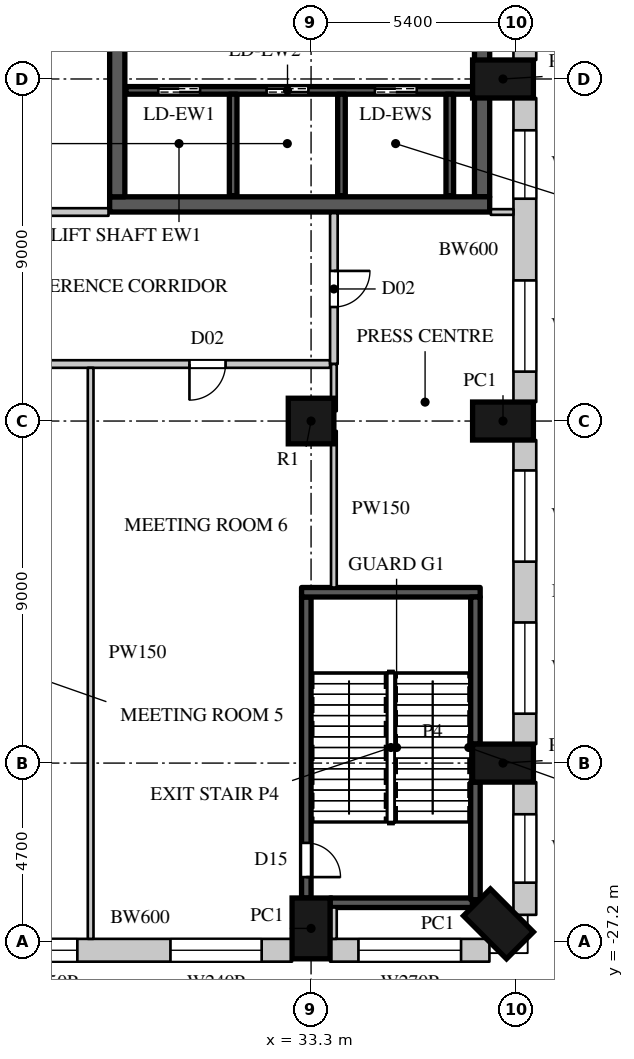
"""IFC4 building model, lengths in metres.
Left out: names, types, materials, properties, quantities, classifications, styles, units other than length and angle.
Written with IfcOpenShell. Run it as: python <this file> out.ifc"""

import sys

from ifc_helpers import new_model, si_unit, direction, frame, frame_2d, origin, origin_2d, place, context, subcontext, project, spatial, rectangle, circle, extrude, element, fill, save


model = new_model("IFC4")
c1 = context("Model", 3, precision=1e-05, world=origin(), true_north=direction((0.0, 1.0)))
c2 = subcontext(c1, "Body", "Model", "MODEL_VIEW")
j1 = project(units=[si_unit("LENGTHUNIT", "METRE"), si_unit("PLANEANGLEUNIT", "RADIAN")], contexts=[c1])
p1 = place(None, origin())
s1 = spatial("IfcSite", under=j1, at=p1, CompositionType="ELEMENT")
p2 = place(p1, origin())
s2 = spatial("IfcBuilding", under=s1, at=p2, CompositionType="ELEMENT")
p3 = place(p2, frame((0.0, 0.0, 19.0)))
s3 = spatial("IfcBuildingStorey", under=s2, at=p3, CompositionType="ELEMENT", Elevation=19.0)
for number, where, z_axis, x_axis in (
    (1, (33.3, -26.85, 0.0), (0.0, 0.0, 1.0), (1.0, 0.0, 0.0)),
    (2, (38.231, -26.731, 0.0), (0.0, 0.0, 1.0), (0.707, 0.707, 0.0)),
    (3, (38.35, -22.5, 0.0), (0.0, 0.0, 1.0), (0.0, 1.0, 0.0)),
    (4, (38.35, -13.5, 0.0), (0.0, 0.0, 1.0), (0.0, 1.0, 0.0)),
    (5, (38.35, -4.5, 0.0), (0.0, 0.0, 1.0), (0.0, 1.0, 0.0)),
):
    element("IfcColumn", number, at=place(p3, frame(where, z_axis=z_axis, x_axis=x_axis)), inside=s3, PredefinedType="COLUMN", context=c2, shape_type="SweptSolid", body=[
        extrude(rectangle(XDim=1.0, YDim=1.6, at=origin_2d()), origin(), (0.0, 0.0, 1.0), 10.0),
    ])
p4 = place(p3, frame((33.3, -13.5, 0.0), z_axis=(0.0, 0.0, 1.0), x_axis=(1.0, 0.0, 0.0)))
e6 = element("IfcColumn", 6, at=p4, inside=s3, PredefinedType="COLUMN", context=c2, shape_type="SweptSolid", body=[
    extrude(circle(Radius=0.6, at=origin_2d()), origin(), (0.0, 0.0, 1.0), 10.0),
])
p5 = place(p3, frame((24.8, -27.425, 0.0), z_axis=(0.0, 0.0, 1.0), x_axis=(1.0, 0.0, 0.0)))
e7 = element("IfcWall", 7, at=p5, inside=s3, PredefinedType="ELEMENTEDWALL", context=c2, shape_type="SweptSolid", body=[
    extrude(rectangle(XDim=8.0, YDim=0.6, at=frame_2d((4.0, 0.0))), origin(), (0.0, 0.0, 1.0), 9.6),
])
p6 = place(p5, frame((4.8, 0.0, 3.0)))
e8 = element("IfcOpeningElement", 8, at=p6, cuts=e7, PredefinedType="OPENING", context=c2, shape_type="SweptSolid", body=[
    extrude(rectangle(XDim=2.4, YDim=2.4, at=frame_2d((1.2, 1.2))), frame((0.0, 0.31, 0.0), z_axis=(0.0, -1.0, 0.0), x_axis=(1.0, 0.0, 0.0)), (0.0, 0.0, 1.0), 0.62),
])
p7 = place(p5, frame((0.85, 0.0, 3.0)))
e9 = element("IfcOpeningElement", 9, at=p7, cuts=e7, PredefinedType="OPENING", context=c2, shape_type="SweptSolid", body=[
    extrude(rectangle(XDim=1.5, YDim=2.4, at=frame_2d((0.75, 1.2))), frame((0.0, 0.31, 0.0), z_axis=(0.0, -1.0, 0.0), x_axis=(1.0, 0.0, 0.0)), (0.0, 0.0, 1.0), 0.62),
])
p8 = place(p3, frame((33.8, -27.425, 0.0), z_axis=(0.0, 0.0, 1.0), x_axis=(1.0, 0.0, 0.0)))
e10 = element("IfcWall", 10, at=p8, inside=s3, PredefinedType="ELEMENTEDWALL", context=c2, shape_type="SweptSolid", body=[
    extrude(rectangle(XDim=4.193, YDim=0.6, at=frame_2d((2.096, 0.0))), origin(), (0.0, 0.0, 1.0), 9.6),
])
p9 = place(p8, frame((0.746, 0.0, 3.0)))
e11 = element("IfcOpeningElement", 11, at=p9, cuts=e10, PredefinedType="OPENING", context=c2, shape_type="SweptSolid", body=[
    extrude(rectangle(XDim=2.7, YDim=2.4, at=frame_2d((1.35, 1.2))), frame((0.0, 0.31, 0.0), z_axis=(0.0, -1.0, 0.0), x_axis=(1.0, 0.0, 0.0)), (0.0, 0.0, 1.0), 0.62),
])
p10 = place(p3, frame((38.925, -26.493, 0.0), z_axis=(0.0, 0.0, 1.0), x_axis=(0.0, 1.0, 0.0)))
e12 = element("IfcWall", 12, at=p10, inside=s3, PredefinedType="ELEMENTEDWALL", context=c2, shape_type="SweptSolid", body=[
    extrude(rectangle(XDim=3.493, YDim=0.6, at=frame_2d((1.747, 0.0))), origin(), (0.0, 0.0, 1.0), 9.6),
])
p11 = place(p10, frame((0.846, 0.0, 3.0)))
e13 = element("IfcOpeningElement", 13, at=p11, cuts=e12, PredefinedType="OPENING", context=c2, shape_type="SweptSolid", body=[
    extrude(rectangle(XDim=1.8, YDim=2.4, at=frame_2d((0.9, 1.2))), frame((0.0, 0.31, 0.0), z_axis=(0.0, -1.0, 0.0), x_axis=(1.0, 0.0, 0.0)), (0.0, 0.0, 1.0), 0.62),
])
p12 = place(p3, frame((38.925, -22.0, 0.0), z_axis=(0.0, 0.0, 1.0), x_axis=(0.0, 1.0, 0.0)))
e14 = element("IfcWall", 14, at=p12, inside=s3, PredefinedType="ELEMENTEDWALL", context=c2, shape_type="SweptSolid", body=[
    extrude(rectangle(XDim=8.0, YDim=0.6, at=frame_2d((4.0, 0.0))), origin(), (0.0, 0.0, 1.0), 9.6),
])
p13 = place(p12, frame((0.8, 0.0, 3.0)))
e15 = element("IfcOpeningElement", 15, at=p13, cuts=e14, PredefinedType="OPENING", context=c2, shape_type="SweptSolid", body=[
    extrude(rectangle(XDim=2.4, YDim=2.4, at=frame_2d((1.2, 1.2))), frame((0.0, 0.31, 0.0), z_axis=(0.0, -1.0, 0.0), x_axis=(1.0, 0.0, 0.0)), (0.0, 0.0, 1.0), 0.62),
])
p14 = place(p12, frame((4.8, 0.0, 3.0)))
e16 = element("IfcOpeningElement", 16, at=p14, cuts=e14, PredefinedType="OPENING", context=c2, shape_type="SweptSolid", body=[
    extrude(rectangle(XDim=2.4, YDim=2.4, at=frame_2d((1.2, 1.2))), frame((0.0, 0.31, 0.0), z_axis=(0.0, -1.0, 0.0), x_axis=(1.0, 0.0, 0.0)), (0.0, 0.0, 1.0), 0.62),
])
p15 = place(p3, frame((38.925, -13.0, 0.0), z_axis=(0.0, 0.0, 1.0), x_axis=(0.0, 1.0, 0.0)))
e17 = element("IfcWall", 17, at=p15, inside=s3, PredefinedType="ELEMENTEDWALL", context=c2, shape_type="SweptSolid", body=[
    extrude(rectangle(XDim=8.0, YDim=0.6, at=frame_2d((4.0, 0.0))), origin(), (0.0, 0.0, 1.0), 9.6),
])
p16 = place(p15, frame((0.8, 0.0, 3.0)))
e18 = element("IfcOpeningElement", 18, at=p16, cuts=e17, PredefinedType="OPENING", context=c2, shape_type="SweptSolid", body=[
    extrude(rectangle(XDim=2.4, YDim=2.4, at=frame_2d((1.2, 1.2))), frame((0.0, 0.31, 0.0), z_axis=(0.0, -1.0, 0.0), x_axis=(1.0, 0.0, 0.0)), (0.0, 0.0, 1.0), 0.62),
])
p17 = place(p15, frame((5.35, 0.0, 3.0)))
e19 = element("IfcOpeningElement", 19, at=p17, cuts=e17, PredefinedType="OPENING", context=c2, shape_type="SweptSolid", body=[
    extrude(rectangle(XDim=1.8, YDim=2.4, at=frame_2d((0.9, 1.2))), frame((0.0, 0.31, 0.0), z_axis=(0.0, -1.0, 0.0), x_axis=(1.0, 0.0, 0.0)), (0.0, 0.0, 1.0), 0.62),
])
p18 = place(p3, frame((38.925, -4.0, 0.0), z_axis=(0.0, 0.0, 1.0), x_axis=(0.0, 1.0, 0.0)))
e20 = element("IfcWall", 20, at=p18, inside=s3, PredefinedType="ELEMENTEDWALL", context=c2, shape_type="SweptSolid", body=[
    extrude(rectangle(XDim=8.0, YDim=0.6, at=frame_2d((4.0, 0.0))), origin(), (0.0, 0.0, 1.0), 9.6),
])
p19 = place(p18, frame((0.8, 0.0, 3.0)))
e21 = element("IfcOpeningElement", 21, at=p19, cuts=e20, PredefinedType="OPENING", context=c2, shape_type="SweptSolid", body=[
    extrude(rectangle(XDim=2.4, YDim=2.4, at=frame_2d((1.2, 1.2))), frame((0.0, 0.31, 0.0), z_axis=(0.0, -1.0, 0.0), x_axis=(1.0, 0.0, 0.0)), (0.0, 0.0, 1.0), 0.62),
])
p20 = place(p18, frame((4.8, 0.0, 3.0)))
e22 = element("IfcOpeningElement", 22, at=p20, cuts=e20, PredefinedType="OPENING", context=c2, shape_type="SweptSolid", body=[
    extrude(rectangle(XDim=2.4, YDim=2.4, at=frame_2d((1.2, 1.2))), frame((0.0, 0.31, 0.0), z_axis=(0.0, -1.0, 0.0), x_axis=(1.0, 0.0, 0.0)), (0.0, 0.0, 1.0), 0.62),
])
p21 = place(p3, frame((28.0, -7.8, 0.0), z_axis=(0.0, 0.0, 1.0), x_axis=(1.0, 0.0, 0.0)))
e23 = element("IfcWall", 23, at=p21, inside=s3, PredefinedType="SHEAR", context=c2, shape_type="SweptSolid", body=[
    extrude(rectangle(XDim=10.0, YDim=0.4, at=frame_2d((5.0, 0.0))), origin(), (0.0, 0.0, 1.0), 10.0),
])
p22 = place(p3, frame((37.8, -7.6, 0.0), z_axis=(0.0, 0.0, 1.0), x_axis=(0.0, 1.0, 0.0)))
e24 = element("IfcWall", 24, at=p22, inside=s3, PredefinedType="SHEAR", context=c2, shape_type="SweptSolid", body=[
    extrude(rectangle(XDim=15.2, YDim=0.4, at=frame_2d((7.6, 0.0))), origin(), (0.0, 0.0, 1.0), 10.0),
])
p23 = place(p3, frame((28.2, -7.6, 0.0), z_axis=(0.0, 0.0, 1.0), x_axis=(0.0, 1.0, 0.0)))
e25 = element("IfcWall", 25, at=p23, inside=s3, PredefinedType="SHEAR", context=c2, shape_type="SweptSolid", body=[
    extrude(rectangle(XDim=15.2, YDim=0.4, at=frame_2d((7.6, 0.0))), origin(), (0.0, 0.0, 1.0), 10.0),
])
p24 = place(p23, frame((4.05, 0.0, 0.0)))
e26 = element("IfcOpeningElement", 26, at=p24, cuts=e25, PredefinedType="OPENING", context=c2, shape_type="SweptSolid", body=[
    extrude(rectangle(XDim=1.5, YDim=2.4, at=frame_2d((0.75, 1.2))), frame((0.0, 0.21, 0.0), z_axis=(0.0, -1.0, 0.0), x_axis=(1.0, 0.0, 0.0)), (0.0, 0.0, 1.0), 0.42),
])
p25 = place(p23, frame((6.95, 0.0, 0.0)))
e27 = element("IfcOpeningElement", 27, at=p25, cuts=e25, PredefinedType="OPENING", context=c2, shape_type="SweptSolid", body=[
    extrude(rectangle(XDim=1.5, YDim=2.4, at=frame_2d((0.75, 1.2))), frame((0.0, 0.21, 0.0), z_axis=(0.0, -1.0, 0.0), x_axis=(1.0, 0.0, 0.0)), (0.0, 0.0, 1.0), 0.42),
])
p26 = place(p3, frame((14.6, -12.0, 0.0), z_axis=(0.0, 0.0, 1.0), x_axis=(1.0, 0.0, 0.0)))
e28 = element("IfcWall", 28, at=p26, inside=s3, PredefinedType="PARTITIONING", context=c2, shape_type="SweptSolid", body=[
    extrude(rectangle(XDim=19.2, YDim=0.2, at=frame_2d((9.6, 0.0))), origin(), (0.0, 0.0, 1.0), 9.598),
])
p27 = place(p26, frame((2.8, 0.0, 0.0)))
e29 = element("IfcOpeningElement", 29, at=p27, cuts=e28, PredefinedType="OPENING", context=c2, shape_type="SweptSolid", body=[
    extrude(rectangle(XDim=0.95, YDim=2.2, at=frame_2d((0.475, 1.1))), frame((0.0, 0.11, 0.0), z_axis=(0.0, -1.0, 0.0), x_axis=(1.0, 0.0, 0.0)), (0.0, 0.0, 1.0), 0.22),
])
p28 = place(p26, frame((10.15, 0.0, 0.0)))
e30 = element("IfcOpeningElement", 30, at=p28, cuts=e28, PredefinedType="OPENING", context=c2, shape_type="SweptSolid", body=[
    extrude(rectangle(XDim=0.95, YDim=2.2, at=frame_2d((0.475, 1.1))), frame((0.0, 0.11, 0.0), z_axis=(0.0, -1.0, 0.0), x_axis=(1.0, 0.0, 0.0)), (0.0, 0.0, 1.0), 0.22),
])
p29 = place(p26, frame((15.5, 0.0, 0.0)))
e31 = element("IfcOpeningElement", 31, at=p29, cuts=e28, PredefinedType="OPENING", context=c2, shape_type="SweptSolid", body=[
    extrude(rectangle(XDim=0.95, YDim=2.2, at=frame_2d((0.475, 1.1))), frame((0.0, 0.11, 0.0), z_axis=(0.0, -1.0, 0.0), x_axis=(1.0, 0.0, 0.0)), (0.0, 0.0, 1.0), 0.22),
])
p30 = place(p3, frame((14.6, -8.0, 0.0), z_axis=(0.0, 0.0, 1.0), x_axis=(1.0, 0.0, 0.0)))
e32 = element("IfcWall", 32, at=p30, inside=s3, PredefinedType="PARTITIONING", context=c2, shape_type="SweptSolid", body=[
    extrude(rectangle(XDim=13.37, YDim=0.2, at=frame_2d((6.685, 0.0))), origin(), (0.0, 0.0, 1.0), 9.598),
])
p31 = place(p30, frame((5.9, 0.0, 0.0)))
e33 = element("IfcOpeningElement", 33, at=p31, cuts=e32, PredefinedType="OPENING", context=c2, shape_type="SweptSolid", body=[
    extrude(rectangle(XDim=1.5, YDim=2.4, at=frame_2d((0.75, 1.2))), frame((0.0, 0.11, 0.0), z_axis=(0.0, -1.0, 0.0), x_axis=(1.0, 0.0, 0.0)), (0.0, 0.0, 1.0), 0.22),
])
p32 = place(p3, frame((33.9, -12.0, 0.0), z_axis=(0.0, 0.0, 1.0), x_axis=(0.0, 1.0, 0.0)))
e34 = element("IfcWall", 34, at=p32, inside=s3, PredefinedType="PARTITIONING", context=c2, shape_type="SweptSolid", body=[
    extrude(rectangle(XDim=3.97, YDim=0.2, at=frame_2d((1.985, 0.0))), origin(), (0.0, 0.0, 1.0), 9.598),
])
p33 = place(p32, frame((1.5, 0.0, 0.0)))
e35 = element("IfcOpeningElement", 35, at=p33, cuts=e34, PredefinedType="OPENING", context=c2, shape_type="SweptSolid", body=[
    extrude(rectangle(XDim=0.95, YDim=2.2, at=frame_2d((0.475, 1.1))), frame((0.0, 0.11, 0.0), z_axis=(0.0, -1.0, 0.0), x_axis=(1.0, 0.0, 0.0)), (0.0, 0.0, 1.0), 0.22),
])
p34 = place(p3, frame((27.5, -27.125, 0.0), z_axis=(0.0, 0.0, 1.0), x_axis=(0.0, 1.0, 0.0)))
e36 = element("IfcWall", 36, at=p34, inside=s3, PredefinedType="PARTITIONING", context=c2, shape_type="SweptSolid", body=[
    extrude(rectangle(XDim=15.025, YDim=0.15, at=frame_2d((7.512, 0.0))), origin(), (0.0, 0.0, 1.0), 9.598),
])
p35 = place(p3, frame((33.9, -27.125, 0.0), z_axis=(0.0, 0.0, 1.0), x_axis=(0.0, 1.0, 0.0)))
e37 = element("IfcWall", 37, at=p35, inside=s3, PredefinedType="PARTITIONING", context=c2, shape_type="SweptSolid", body=[
    extrude(rectangle(XDim=0.825, YDim=0.15, at=frame_2d((0.413, 0.0))), origin(), (0.0, 0.0, 1.0), 9.598),
])
p36 = place(p3, frame((33.9, -17.88, 0.0), z_axis=(0.0, 0.0, 1.0), x_axis=(0.0, 1.0, 0.0)))
e38 = element("IfcWall", 38, at=p36, inside=s3, PredefinedType="PARTITIONING", context=c2, shape_type="SweptSolid", body=[
    extrude(rectangle(XDim=4.12, YDim=0.15, at=frame_2d((2.06, 0.0))), origin(), (0.0, 0.0, 1.0), 9.598),
])
p37 = place(p3, frame((33.9, -13.24, 0.0), z_axis=(0.0, 0.0, 1.0), x_axis=(0.0, 1.0, 0.0)))
e39 = element("IfcWall", 39, at=p37, inside=s3, PredefinedType="PARTITIONING", context=c2, shape_type="SweptSolid", body=[
    extrude(rectangle(XDim=1.24, YDim=0.15, at=frame_2d((0.62, 0.0))), origin(), (0.0, 0.0, 1.0), 9.598),
])
p38 = place(p3, frame((38.03, -8.0, 0.0), z_axis=(0.0, 0.0, 1.0), x_axis=(1.0, 0.0, 0.0)))
e40 = element("IfcWall", 40, at=p38, inside=s3, PredefinedType="PARTITIONING", context=c2, shape_type="SweptSolid", body=[
    extrude(rectangle(XDim=0.595, YDim=0.15, at=frame_2d((0.297, 0.0))), origin(), (0.0, 0.0, 1.0), 9.598),
])
p39 = place(p3, frame((28.43, -4.8, 0.0), z_axis=(0.0, 0.0, 1.0), x_axis=(1.0, 0.0, 0.0)))
e41 = element("IfcWall", 41, at=p39, inside=s3, PredefinedType="SHEAR", context=c2, shape_type="SweptSolid", body=[
    extrude(rectangle(XDim=9.13, YDim=0.2, at=frame_2d((4.565, 0.0))), origin(), (0.0, 0.0, 1.0), 9.598),
])
p40 = place(p39, frame((0.85, 0.0, 0.0)))
e42 = element("IfcOpeningElement", 42, at=p40, cuts=e41, PredefinedType="OPENING", context=c2, shape_type="SweptSolid", body=[
    extrude(rectangle(XDim=1.1, YDim=2.2, at=frame_2d((0.55, 1.1))), frame((0.0, 0.11, 0.0), z_axis=(0.0, -1.0, 0.0), x_axis=(1.0, 0.0, 0.0)), (0.0, 0.0, 1.0), 0.22),
])
p41 = place(p39, frame((3.7, 0.0, 0.0)))
e43 = element("IfcOpeningElement", 43, at=p41, cuts=e41, PredefinedType="OPENING", context=c2, shape_type="SweptSolid", body=[
    extrude(rectangle(XDim=1.1, YDim=2.2, at=frame_2d((0.55, 1.1))), frame((0.0, 0.11, 0.0), z_axis=(0.0, -1.0, 0.0), x_axis=(1.0, 0.0, 0.0)), (0.0, 0.0, 1.0), 0.22),
])
p42 = place(p39, frame((6.55, 0.0, 0.0)))
e44 = element("IfcOpeningElement", 44, at=p42, cuts=e41, PredefinedType="OPENING", context=c2, shape_type="SweptSolid", body=[
    extrude(rectangle(XDim=1.1, YDim=2.2, at=frame_2d((0.55, 1.1))), frame((0.0, 0.11, 0.0), z_axis=(0.0, -1.0, 0.0), x_axis=(1.0, 0.0, 0.0)), (0.0, 0.0, 1.0), 0.22),
])
for number, where, z_axis, x_axis in (
    (45, (31.25, -7.57, 0.0), (0.0, 0.0, 1.0), (0.0, 1.0, 0.0)),
    (46, (34.1, -7.57, 0.0), (0.0, 0.0, 1.0), (0.0, 1.0, 0.0)),
):
    element("IfcWall", number, at=place(p3, frame(where, z_axis=z_axis, x_axis=x_axis)), inside=s3, PredefinedType="SHEAR", context=c2, shape_type="SweptSolid", body=[
        extrude(rectangle(XDim=2.67, YDim=0.2, at=frame_2d((1.335, 0.0))), origin(), (0.0, 0.0, 1.0), 10.0),
    ])
p43 = place(p3, frame((36.95, -7.57, 0.0), z_axis=(0.0, 0.0, 1.0), x_axis=(0.0, 1.0, 0.0)))
e47 = element("IfcWall", 47, at=p43, inside=s3, PredefinedType="SHEAR", context=c2, shape_type="SweptSolid", body=[
    extrude(rectangle(XDim=2.67, YDim=0.2, at=frame_2d((1.335, 0.0))), origin(), (0.0, 0.0, 1.0), 9.598),
])
p44 = place(p3, frame((33.175, -26.05, 0.0), z_axis=(0.0, 0.0, 1.0), x_axis=(0.0, 1.0, 0.0)))
e48 = element("IfcWall", 48, at=p44, inside=s3, PredefinedType="SHEAR", context=c2, shape_type="SweptSolid", body=[
    extrude(rectangle(XDim=7.92, YDim=0.25, at=frame_2d((3.96, 0.0))), origin(), (0.0, 0.0, 1.0), 9.6),
])
p45 = place(p44, frame((0.55, 0.0, 0.0)))
e49 = element("IfcOpeningElement", 49, at=p45, cuts=e48, PredefinedType="OPENING", context=c2, shape_type="SweptSolid", body=[
    extrude(rectangle(XDim=0.9, YDim=2.2, at=frame_2d((0.45, 1.1))), frame((0.0, 0.135, 0.0), z_axis=(0.0, -1.0, 0.0), x_axis=(1.0, 0.0, 0.0)), (0.0, 0.0, 1.0), 0.27),
])
p46 = place(p3, frame((33.8, -26.175, 0.0), z_axis=(0.0, 0.0, 1.0), x_axis=(1.0, 0.0, 0.0)))
e50 = element("IfcWall", 50, at=p46, inside=s3, PredefinedType="SHEAR", context=c2, shape_type="SweptSolid", body=[
    extrude(rectangle(XDim=3.745, YDim=0.25, at=frame_2d((1.873, 0.0))), origin(), (0.0, 0.0, 1.0), 9.6),
])
p47 = place(p3, frame((33.05, -18.005, 0.0), z_axis=(0.0, 0.0, 1.0), x_axis=(1.0, 0.0, 0.0)))
e51 = element("IfcWall", 51, at=p47, inside=s3, PredefinedType="SHEAR", context=c2, shape_type="SweptSolid", body=[
    extrude(rectangle(XDim=4.7, YDim=0.25, at=frame_2d((2.35, 0.0))), origin(), (0.0, 0.0, 1.0), 9.6),
])
p48 = place(p3, frame((37.625, -26.095, 0.0), z_axis=(0.0, 0.0, 1.0), x_axis=(0.0, 1.0, 0.0)))
e52 = element("IfcWall", 52, at=p48, inside=s3, PredefinedType="SHEAR", context=c2, shape_type="SweptSolid", body=[
    extrude(rectangle(XDim=3.095, YDim=0.25, at=frame_2d((1.548, 0.0))), origin(), (0.0, 0.0, 1.0), 9.6),
])
p49 = place(p3, frame((37.625, -22.0, 0.0), z_axis=(0.0, 0.0, 1.0), x_axis=(0.0, 1.0, 0.0)))
e53 = element("IfcWall", 53, at=p49, inside=s3, PredefinedType="SHEAR", context=c2, shape_type="SweptSolid", body=[
    extrude(rectangle(XDim=3.87, YDim=0.25, at=frame_2d((1.935, 0.0))), origin(), (0.0, 0.0, 1.0), 9.6),
])
p50 = place(p6, origin())
e54 = element("IfcWindow", 54, at=p50, inside=s3, PartitioningType="SINGLE_PANEL", PredefinedType="WINDOW", context=c2, shape_type="SweptSolid", body=[
    extrude(rectangle(XDim=2.4, YDim=2.4, at=frame_2d((1.2, 1.2))), frame((0.0, 0.06, 0.0), z_axis=(0.0, -1.0, 0.0), x_axis=(1.0, 0.0, 0.0)), (0.0, 0.0, 1.0), 0.06),
])
fill(e8, e54)
p51 = place(p9, origin())
e55 = element("IfcWindow", 55, at=p51, inside=s3, PartitioningType="SINGLE_PANEL", PredefinedType="WINDOW", context=c2, shape_type="SweptSolid", body=[
    extrude(rectangle(XDim=2.7, YDim=2.4, at=frame_2d((1.35, 1.2))), frame((0.0, 0.06, 0.0), z_axis=(0.0, -1.0, 0.0), x_axis=(1.0, 0.0, 0.0)), (0.0, 0.0, 1.0), 0.06),
])
fill(e11, e55)
p52 = place(p11, origin())
e56 = element("IfcWindow", 56, at=p52, inside=s3, PartitioningType="SINGLE_PANEL", PredefinedType="WINDOW", context=c2, shape_type="SweptSolid", body=[
    extrude(rectangle(XDim=1.8, YDim=2.4, at=frame_2d((0.9, 1.2))), frame((0.0, 0.06, 0.0), z_axis=(0.0, -1.0, 0.0), x_axis=(1.0, 0.0, 0.0)), (0.0, 0.0, 1.0), 0.06),
])
fill(e13, e56)
p53 = place(p13, origin())
e57 = element("IfcWindow", 57, at=p53, inside=s3, PartitioningType="SINGLE_PANEL", PredefinedType="WINDOW", context=c2, shape_type="SweptSolid", body=[
    extrude(rectangle(XDim=2.4, YDim=2.4, at=frame_2d((1.2, 1.2))), frame((0.0, 0.06, 0.0), z_axis=(0.0, -1.0, 0.0), x_axis=(1.0, 0.0, 0.0)), (0.0, 0.0, 1.0), 0.06),
])
fill(e15, e57)
p54 = place(p14, origin())
e58 = element("IfcWindow", 58, at=p54, inside=s3, PartitioningType="SINGLE_PANEL", PredefinedType="WINDOW", context=c2, shape_type="SweptSolid", body=[
    extrude(rectangle(XDim=2.4, YDim=2.4, at=frame_2d((1.2, 1.2))), frame((0.0, 0.06, 0.0), z_axis=(0.0, -1.0, 0.0), x_axis=(1.0, 0.0, 0.0)), (0.0, 0.0, 1.0), 0.06),
])
fill(e16, e58)
p55 = place(p16, origin())
e59 = element("IfcWindow", 59, at=p55, inside=s3, PartitioningType="SINGLE_PANEL", PredefinedType="WINDOW", context=c2, shape_type="SweptSolid", body=[
    extrude(rectangle(XDim=2.4, YDim=2.4, at=frame_2d((1.2, 1.2))), frame((0.0, 0.06, 0.0), z_axis=(0.0, -1.0, 0.0), x_axis=(1.0, 0.0, 0.0)), (0.0, 0.0, 1.0), 0.06),
])
fill(e18, e59)
p56 = place(p40, origin())
e60 = element("IfcDoor", 60, at=p56, inside=s3, OperationType="DOUBLE_DOOR_SLIDING", PredefinedType="DOOR", context=c2, shape_type="SweptSolid", body=[
    extrude(rectangle(XDim=1.1, YDim=2.2, at=frame_2d((0.55, 1.1))), frame((0.0, 0.025, 0.0), z_axis=(0.0, -1.0, 0.0), x_axis=(1.0, 0.0, 0.0)), (0.0, 0.0, 1.0), 0.05),
])
fill(e42, e60)
p57 = place(p41, origin())
e61 = element("IfcDoor", 61, at=p57, inside=s3, OperationType="DOUBLE_DOOR_SLIDING", PredefinedType="DOOR", context=c2, shape_type="SweptSolid", body=[
    extrude(rectangle(XDim=1.1, YDim=2.2, at=frame_2d((0.55, 1.1))), frame((0.0, 0.025, 0.0), z_axis=(0.0, -1.0, 0.0), x_axis=(1.0, 0.0, 0.0)), (0.0, 0.0, 1.0), 0.05),
])
fill(e43, e61)
p58 = place(p42, origin())
e62 = element("IfcDoor", 62, at=p58, inside=s3, OperationType="DOUBLE_DOOR_SLIDING", PredefinedType="DOOR", context=c2, shape_type="SweptSolid", body=[
    extrude(rectangle(XDim=1.1, YDim=2.2, at=frame_2d((0.55, 1.1))), frame((0.0, 0.025, 0.0), z_axis=(0.0, -1.0, 0.0), x_axis=(1.0, 0.0, 0.0)), (0.0, 0.0, 1.0), 0.05),
])
fill(e44, e62)
p59 = place(p29, origin())
e63 = element("IfcDoor", 63, at=p59, inside=s3, OperationType="SINGLE_SWING_RIGHT", PredefinedType="DOOR", context=c2, shape_type="SweptSolid", body=[
    extrude(rectangle(XDim=0.95, YDim=2.2, at=frame_2d((0.475, 1.1))), frame((0.0, 0.025, 0.0), z_axis=(0.0, -1.0, 0.0), x_axis=(1.0, 0.0, 0.0)), (0.0, 0.0, 1.0), 0.05),
])
fill(e31, e63)
p60 = place(p33, origin())
e64 = element("IfcDoor", 64, at=p60, inside=s3, OperationType="SINGLE_SWING_LEFT", PredefinedType="DOOR", context=c2, shape_type="SweptSolid", body=[
    extrude(rectangle(XDim=0.95, YDim=2.2, at=frame_2d((0.475, 1.1))), frame((0.0, 0.025, 0.0), z_axis=(0.0, -1.0, 0.0), x_axis=(1.0, 0.0, 0.0)), (0.0, 0.0, 1.0), 0.05),
])
fill(e35, e64)
p61 = place(p45, origin())
e65 = element("IfcDoor", 65, at=p61, inside=s3, OperationType="SINGLE_SWING_RIGHT", PredefinedType="DOOR", context=c2, shape_type="SweptSolid", body=[
    extrude(rectangle(XDim=0.9, YDim=2.2, at=frame_2d((0.45, 1.1))), frame((0.0, 0.025, 0.0), z_axis=(0.0, -1.0, 0.0), x_axis=(1.0, 0.0, 0.0)), (0.0, 0.0, 1.0), 0.05),
])
fill(e49, e65)
p62 = place(p7, origin())
e66 = element("IfcWindow", 66, at=p62, inside=s3, PartitioningType="SINGLE_PANEL", PredefinedType="WINDOW", context=c2, shape_type="SweptSolid", body=[
    extrude(rectangle(XDim=1.5, YDim=2.4, at=frame_2d((0.75, 1.2))), frame((0.0, 0.06, 0.0), z_axis=(0.0, -1.0, 0.0), x_axis=(1.0, 0.0, 0.0)), (0.0, 0.0, 1.0), 0.06),
])
fill(e9, e66)
p63 = place(p17, origin())
e67 = element("IfcWindow", 67, at=p63, inside=s3, PartitioningType="SINGLE_PANEL", PredefinedType="WINDOW", context=c2, shape_type="SweptSolid", body=[
    extrude(rectangle(XDim=1.8, YDim=2.4, at=frame_2d((0.9, 1.2))), frame((0.0, 0.06, 0.0), z_axis=(0.0, -1.0, 0.0), x_axis=(1.0, 0.0, 0.0)), (0.0, 0.0, 1.0), 0.06),
])
fill(e19, e67)
save(model, sys.argv[1])
